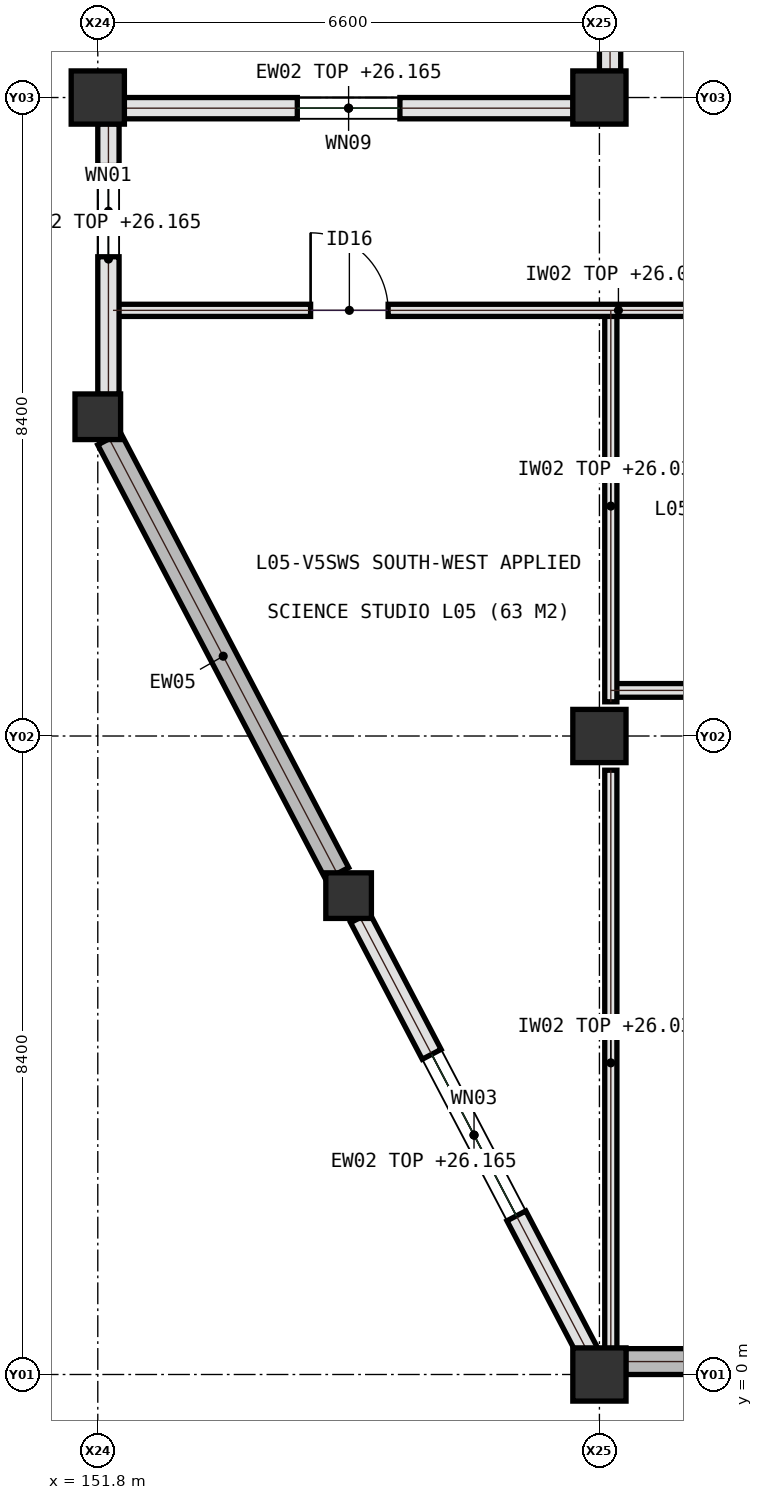
"""IFC4 building model, lengths in metres.
Left out: names, types, materials, properties, quantities, classifications, styles, units other than length and angle.
Written with IfcOpenShell. Run it as: python <this file> out.ifc"""

import sys

from ifc_helpers import new_model, si_unit, direction, frame, frame_2d, origin, origin_2d, place, context, subcontext, project, spatial, rectangle, extrude, element, fill, save


model = new_model("IFC4")
c1 = context("Model", 3, precision=1e-05, world=origin(), true_north=direction((0.0, 1.0)))
c2 = subcontext(c1, "Body", "Model", "MODEL_VIEW")
j1 = project(units=[si_unit("LENGTHUNIT", "METRE"), si_unit("PLANEANGLEUNIT", "RADIAN")], contexts=[c1])
p1 = place(None, origin())
s1 = spatial("IfcSite", under=j1, at=p1, CompositionType="ELEMENT")
p2 = place(p1, origin())
s2 = spatial("IfcBuilding", under=s1, at=p2, CompositionType="ELEMENT")
p3 = place(p2, frame((0.0, 0.0, 22.8)))
s3 = spatial("IfcBuildingStorey", under=s2, at=p3, CompositionType="ELEMENT", Elevation=22.8)
for number, where, z_axis, x_axis in (
    (1, (151.8, 16.8, 0.0), (0.0, 0.0, 1.0), (1.0, 0.0, 0.0)),
    (2, (158.4, 0.0, 0.0), (0.0, 0.0, 1.0), (1.0, 0.0, 0.0)),
    (3, (158.4, 8.4, 0.0), (0.0, 0.0, 1.0), (1.0, 0.0, 0.0)),
    (4, (158.4, 16.8, 0.0), (0.0, 0.0, 1.0), (1.0, 0.0, 0.0)),
):
    element("IfcColumn", number, at=place(p3, frame(where, z_axis=z_axis, x_axis=x_axis)), inside=s3, PredefinedType="COLUMN", context=c2, shape_type="SweptSolid", body=[
        extrude(rectangle(XDim=0.7, YDim=0.7, at=origin_2d()), origin(), (0.0, 0.0, 1.0), 4.2),
    ])
for number, where, z_axis, x_axis in (
    (5, (151.8, 12.6, 0.0), (0.0, 0.0, 1.0), (1.0, 0.0, 0.0)),
    (6, (155.1, 6.3, 0.0), (0.0, 0.0, 1.0), (1.0, 0.0, 0.0)),
):
    element("IfcColumn", number, at=place(p3, frame(where, z_axis=z_axis, x_axis=x_axis)), inside=s3, PredefinedType="COLUMN", context=c2, shape_type="SweptSolid", body=[
        extrude(rectangle(XDim=0.6, YDim=0.6, at=origin_2d()), origin(), (0.0, 0.0, 1.0), 4.2),
    ])
p4 = place(p3, frame((158.55, 9.0, 0.0), z_axis=(0.0, 0.0, 1.0), x_axis=(1.0, 0.0, 0.0)))
e7 = element("IfcWall", 7, at=p4, inside=s3, PredefinedType="SOLIDWALL", context=c2, shape_type="SweptSolid", body=[
    extrude(rectangle(XDim=6.75, YDim=0.18, at=frame_2d((3.375, 0.0))), origin(), (0.0, 0.0, 1.0), 3.23),
])
p5 = place(p4, frame((2.5, 0.0, 0.0)))
e8 = element("IfcOpeningElement", 8, at=p5, cuts=e7, PredefinedType="OPENING", context=c2, shape_type="SweptSolid", body=[
    extrude(rectangle(XDim=1.6, YDim=2.2, at=frame_2d((0.8, 1.1))), frame((0.0, 0.1, 0.0), z_axis=(0.0, -1.0, 0.0), x_axis=(1.0, 0.0, 0.0)), (0.0, 0.0, 1.0), 0.2),
])
p6 = place(p3, frame((158.55, 0.25, 0.0), z_axis=(0.0, 0.0, 1.0), x_axis=(0.0, 1.0, 0.0)))
e9 = element("IfcWall", 9, at=p6, inside=s3, PredefinedType="PARTITIONING", context=c2, shape_type="SweptSolid", body=[
    extrude(rectangle(XDim=7.7, YDim=0.16, at=frame_2d((3.85, 0.0))), origin(), (0.0, 0.0, 1.0), 3.23),
])
p7 = place(p3, frame((158.55, 8.85, 0.0), z_axis=(0.0, 0.0, 1.0), x_axis=(0.0, 1.0, 0.0)))
e10 = element("IfcWall", 10, at=p7, inside=s3, PredefinedType="PARTITIONING", context=c2, shape_type="SweptSolid", body=[
    extrude(rectangle(XDim=5.15, YDim=0.16, at=frame_2d((2.575, 0.0))), origin(), (0.0, 0.0, 1.0), 3.23),
])
p8 = place(p3, frame((152.0, 14.0, 0.0), z_axis=(0.0, 0.0, 1.0), x_axis=(1.0, 0.0, 0.0)))
e11 = element("IfcWall", 11, at=p8, inside=s3, PredefinedType="PARTITIONING", context=c2, shape_type="SweptSolid", body=[
    extrude(rectangle(XDim=13.3, YDim=0.16, at=frame_2d((6.65, 0.0))), origin(), (0.0, 0.0, 1.0), 3.23),
])
p9 = place(p8, frame((2.6, 0.0, 0.0)))
e12 = element("IfcOpeningElement", 12, at=p9, cuts=e11, PredefinedType="OPENING", context=c2, shape_type="SweptSolid", body=[
    extrude(rectangle(XDim=1.02, YDim=2.18, at=frame_2d((0.51, 1.09))), frame((0.0, 0.09, 0.0), z_axis=(0.0, -1.0, 0.0), x_axis=(1.0, 0.0, 0.0)), (0.0, 0.0, 1.0), 0.18),
])
p10 = place(p8, frame((9.8, 0.0, 0.0)))
e13 = element("IfcOpeningElement", 13, at=p10, cuts=e11, PredefinedType="OPENING", context=c2, shape_type="SweptSolid", body=[
    extrude(rectangle(XDim=1.02, YDim=2.18, at=frame_2d((0.51, 1.09))), frame((0.0, 0.09, 0.0), z_axis=(0.0, -1.0, 0.0), x_axis=(1.0, 0.0, 0.0)), (0.0, 0.0, 1.0), 0.18),
])
p11 = place(p3, frame((158.055, 16.66, 0.0), z_axis=(0.0, 0.0, 1.0), x_axis=(-1.0, 0.0, 0.0)))
e14 = element("IfcWall", 14, at=p11, inside=s3, PredefinedType="SOLIDWALL", context=c2, shape_type="SweptSolid", body=[
    extrude(rectangle(XDim=5.91, YDim=0.28, at=frame_2d((2.955, 0.0))), origin(), (0.0, 0.0, 1.0), 3.365),
])
p12 = place(p11, frame((2.28, 0.0, 0.95)))
e15 = element("IfcOpeningElement", 15, at=p12, cuts=e14, PredefinedType="OPENING", context=c2, shape_type="SweptSolid", body=[
    extrude(rectangle(XDim=1.35, YDim=1.55, at=frame_2d((0.675, 0.775))), frame((0.0, 0.15, 0.0), z_axis=(0.0, -1.0, 0.0), x_axis=(1.0, 0.0, 0.0)), (0.0, 0.0, 1.0), 0.3),
])
p13 = place(p3, frame((158.745, 0.17, 0.0), z_axis=(0.0, 0.0, 1.0), x_axis=(1.0, 0.0, 0.0)))
e16 = element("IfcWall", 16, at=p13, inside=s3, PredefinedType="SHEAR", context=c2, shape_type="SweptSolid", body=[
    extrude(rectangle(XDim=5.91, YDim=0.34, at=frame_2d((2.955, 0.0))), origin(), (0.0, 0.0, 1.0), 3.98),
])
p14 = place(p3, frame((158.54, 24.855, 0.0), z_axis=(0.0, 0.0, 1.0), x_axis=(0.0, -1.0, 0.0)))
e17 = element("IfcWall", 17, at=p14, inside=s3, PredefinedType="SOLIDWALL", context=c2, shape_type="SweptSolid", body=[
    extrude(rectangle(XDim=7.71, YDim=0.28, at=frame_2d((3.855, 0.0))), origin(), (0.0, 0.0, 1.0), 3.265),
])
p15 = place(p14, frame((2.305, 0.0, 0.95)))
e18 = element("IfcOpeningElement", 18, at=p15, cuts=e17, PredefinedType="OPENING", context=c2, shape_type="SweptSolid", body=[
    extrude(rectangle(XDim=3.1, YDim=2.05, at=frame_2d((1.55, 1.025))), frame((0.0, 0.15, 0.0), z_axis=(0.0, -1.0, 0.0), x_axis=(1.0, 0.0, 0.0)), (0.0, 0.0, 1.0), 0.3),
])
p16 = place(p3, frame((151.94, 16.455, 0.0), z_axis=(0.0, 0.0, 1.0), x_axis=(0.0, -1.0, 0.0)))
e19 = element("IfcWall", 19, at=p16, inside=s3, PredefinedType="SOLIDWALL", context=c2, shape_type="SweptSolid", body=[
    extrude(rectangle(XDim=3.56, YDim=0.28, at=frame_2d((1.78, 0.0))), origin(), (0.0, 0.0, 1.0), 3.365),
])
p17 = place(p16, frame((0.55, 0.0, 0.95)))
e20 = element("IfcOpeningElement", 20, at=p17, cuts=e19, PredefinedType="OPENING", context=c2, shape_type="SweptSolid", body=[
    extrude(rectangle(XDim=1.2, YDim=1.5, at=frame_2d((0.6, 0.75))), frame((0.0, 0.15, 0.0), z_axis=(0.0, -1.0, 0.0), x_axis=(1.0, 0.0, 0.0)), (0.0, 0.0, 1.0), 0.3),
])
p18 = place(p3, frame((151.95, 12.31, 0.0), z_axis=(0.0, 0.0, 1.0), x_axis=(0.464471613901, -0.885588007981, 0.0)))
e21 = element("IfcWall", 21, at=p18, inside=s3, PredefinedType="SHEAR", context=c2, shape_type="SweptSolid", body=[
    extrude(rectangle(XDim=6.459, YDim=0.34, at=frame_2d((3.229, 0.0))), origin(), (0.0, 0.0, 1.0), 3.98),
])
p19 = place(p3, frame((155.25, 6.01, 0.0), z_axis=(0.0, 0.0, 1.0), x_axis=(0.464471613901, -0.885588007981, 0.0)))
e22 = element("IfcWall", 22, at=p19, inside=s3, PredefinedType="SOLIDWALL", context=c2, shape_type="SweptSolid", body=[
    extrude(rectangle(XDim=6.459, YDim=0.28, at=frame_2d((3.229, 0.0))), origin(), (0.0, 0.0, 1.0), 3.365),
])
p20 = place(p19, frame((2.03, 0.0, 0.95)))
e23 = element("IfcOpeningElement", 23, at=p20, cuts=e22, PredefinedType="OPENING", context=c2, shape_type="SweptSolid", body=[
    extrude(rectangle(XDim=2.4, YDim=1.6, at=frame_2d((1.2, 0.8))), frame((0.0, 0.15, 0.0), z_axis=(0.0, -1.0, 0.0), x_axis=(1.0, 0.0, 0.0)), (0.0, 0.0, 1.0), 0.3),
])
p21 = place(p9, origin())
e24 = element("IfcDoor", 24, at=p21, inside=s3, OperationType="SINGLE_SWING_LEFT", PredefinedType="DOOR", context=c2, shape_type="SweptSolid", body=[
    extrude(rectangle(XDim=1.02, YDim=2.18, at=frame_2d((0.51, 1.09))), frame((0.0, 0.025, 0.0), z_axis=(0.0, -1.0, 0.0), x_axis=(1.0, 0.0, 0.0)), (0.0, 0.0, 1.0), 0.05),
])
fill(e12, e24)
p22 = place(p12, origin())
e25 = element("IfcWindow", 25, at=p22, inside=s3, PartitioningType="SINGLE_PANEL", PredefinedType="WINDOW", context=c2, shape_type="SweptSolid", body=[
    extrude(rectangle(XDim=1.35, YDim=1.55, at=frame_2d((0.675, 0.775))), frame((0.0, 0.03, 0.0), z_axis=(0.0, -1.0, 0.0), x_axis=(1.0, 0.0, 0.0)), (0.0, 0.0, 1.0), 0.06),
])
fill(e15, e25)
p23 = place(p17, origin())
e26 = element("IfcWindow", 26, at=p23, inside=s3, PartitioningType="SINGLE_PANEL", PredefinedType="WINDOW", context=c2, shape_type="SweptSolid", body=[
    extrude(rectangle(XDim=1.2, YDim=1.5, at=frame_2d((0.6, 0.75))), frame((0.0, 0.03, 0.0), z_axis=(0.0, -1.0, 0.0), x_axis=(1.0, 0.0, 0.0)), (0.0, 0.0, 1.0), 0.06),
])
fill(e20, e26)
p24 = place(p20, origin())
e27 = element("IfcWindow", 27, at=p24, inside=s3, PartitioningType="SINGLE_PANEL", PredefinedType="WINDOW", context=c2, shape_type="SweptSolid", body=[
    extrude(rectangle(XDim=2.4, YDim=1.6, at=frame_2d((1.2, 0.8))), frame((0.0, 0.03, 0.0), z_axis=(0.0, -1.0, 0.0), x_axis=(1.0, 0.0, 0.0)), (0.0, 0.0, 1.0), 0.06),
])
fill(e23, e27)
save(model, sys.argv[1])
